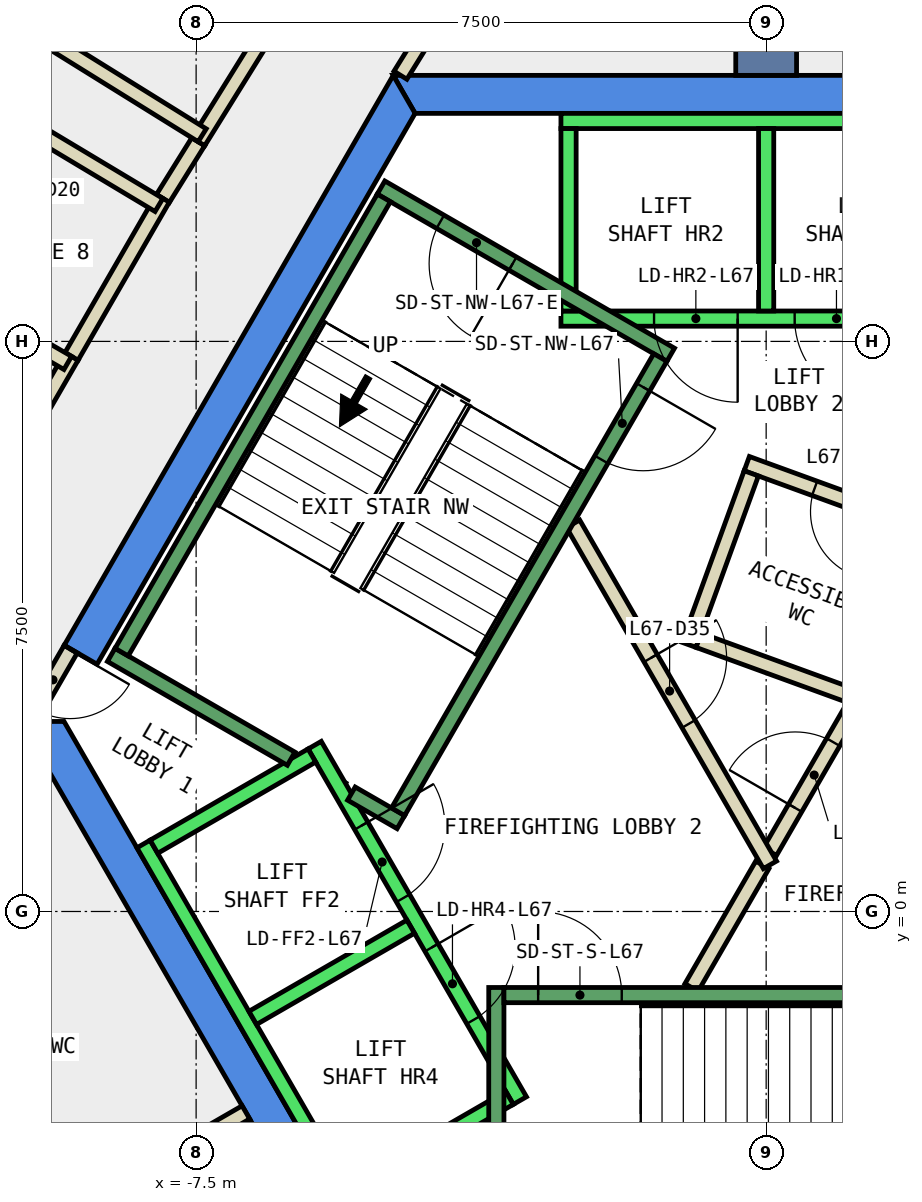
"""IFC4 building model, lengths in metres.
Left out: names, types, materials, properties, quantities, classifications, styles, units other than length and angle.
Written with IfcOpenShell. Run it as: python <this file> out.ifc"""

import sys

from ifc_helpers import new_model, si_unit, direction, frame, frame_2d, origin, place, context, subcontext, project, spatial, polyline, rectangle, outline, extrude, element, fill, save


model = new_model("IFC4")
c1 = context("Model", 3, precision=1e-05, world=origin(), true_north=direction((0.0, 1.0)))
c2 = subcontext(c1, "Body", "Model", "MODEL_VIEW")
j1 = project(units=[si_unit("LENGTHUNIT", "METRE"), si_unit("PLANEANGLEUNIT", "RADIAN")], contexts=[c1])
p1 = place(None, origin())
s1 = spatial("IfcSite", under=j1, at=p1, CompositionType="ELEMENT")
p2 = place(p1, origin())
s2 = spatial("IfcBuilding", under=s1, at=p2, CompositionType="ELEMENT")
p3 = place(p2, frame((0.0, 0.0, 290.0)))
s3 = spatial("IfcBuildingStorey", under=s2, at=p3, CompositionType="ELEMENT", Elevation=290.0)
p4 = place(p3, frame((0.0, 0.0, -0.34)))
e1 = element("IfcWall", 1, at=p4, inside=s3, PredefinedType="SHEAR", context=c2, shape_type="SweptSolid", body=[
    extrude(outline(polyline([(4.907, 11.0), (-4.907, 11.0), (-4.619, 10.5), (4.619, 10.5), (4.907, 11.0)])), origin(), (0.0, 0.0, 1.0), 3.6),
])
p5 = place(p3, frame((0.0, 0.0, -0.34)))
e2 = element("IfcWall", 2, at=p5, inside=s3, PredefinedType="SHEAR", context=c2, shape_type="SweptSolid", body=[
    extrude(outline(polyline([(-9.236, 3.502), (-8.803, 3.253), (-4.619, 10.5), (-4.907, 11.0), (-9.236, 3.502)])), origin(), (0.0, 0.0, 1.0), 3.6),
])
p6 = place(p3, frame((0.0, 0.0, -0.34)))
e3 = element("IfcWall", 3, at=p6, inside=s3, PredefinedType="SHEAR", context=c2, shape_type="SweptSolid", body=[
    extrude(outline(polyline([(-9.815, 2.5), (-4.907, -6.0), (-4.619, -5.5), (-9.238, 2.5), (-9.815, 2.5)])), origin(), (0.0, 0.0, 1.0), 3.6),
])
p7 = place(p3, frame((0.0, 11.0, -0.34), z_axis=(0.0, 0.0, 1.0), x_axis=(0.0, 1.0, 0.0)))
e4 = element("IfcWall", 4, at=p7, inside=s3, PredefinedType="SHEAR", context=c2, shape_type="SweptSolid", body=[
    extrude(rectangle(XDim=9.0, YDim=0.8, at=frame_2d((4.5, 0.0))), origin(), (0.0, 0.0, 1.0), 3.6),
])
p8 = place(p3, frame((2.376, 4.934, 0.0), z_axis=(0.0, 0.0, 1.0), x_axis=(-0.939640574808, 0.342163104635, 0.0)))
e5 = element("IfcWall", 5, at=p8, inside=s3, PredefinedType="PARTITIONING", context=c2, shape_type="SweptSolid", body=[
    extrude(rectangle(XDim=2.8, YDim=0.2, at=frame_2d((1.4, 0.0))), origin(), (0.0, 0.0, 1.0), 3.26),
])
p9 = place(p8, frame((0.95, 0.0, 0.0)))
e6 = element("IfcOpeningElement", 6, at=p9, cuts=e5, PredefinedType="OPENING", context=c2, shape_type="SweptSolid", body=[
    extrude(rectangle(XDim=0.9, YDim=2.1, at=frame_2d((0.45, 1.05))), frame((0.0, 0.11, 0.0), z_axis=(0.0, -1.0, 0.0), x_axis=(1.0, 0.0, 0.0)), (0.0, 0.0, 1.0), 0.22),
])
p10 = place(p3, frame((-0.196, 5.764, 0.0), z_axis=(0.0, 0.0, 1.0), x_axis=(-0.34165322761, -0.939826086073, 0.0)))
e7 = element("IfcWall", 7, at=p10, inside=s3, PredefinedType="PARTITIONING", context=c2, shape_type="SweptSolid", body=[
    extrude(rectangle(XDim=2.4, YDim=0.2, at=frame_2d((1.2, 0.0))), origin(), (0.0, 0.0, 1.0), 3.26),
])
p11 = place(p3, frame((-0.888, 3.568, 0.0), z_axis=(0.0, 0.0, 1.0), x_axis=(0.939685034098, -0.34204098686, 0.0)))
e8 = element("IfcWall", 8, at=p11, inside=s3, PredefinedType="PARTITIONING", context=c2, shape_type="SweptSolid", body=[
    extrude(rectangle(XDim=2.237, YDim=0.2, at=frame_2d((1.119, 0.0))), origin(), (0.0, 0.0, 1.0), 3.26),
])
p12 = place(p3, frame((-4.478, 11.54, 0.0), z_axis=(0.0, 0.0, 1.0), x_axis=(-0.527362861778, -0.849640166198, 0.0)))
e9 = element("IfcWall", 9, at=p12, inside=s3, PredefinedType="PARTITIONING", context=c2, shape_type="SweptSolid", body=[
    extrude(rectangle(XDim=0.633, YDim=0.2, at=frame_2d((0.317, 0.0))), origin(), (0.0, 0.0, 1.0), 3.26),
])
p13 = place(p3, frame((-7.937, 9.38, 0.0), z_axis=(0.0, 0.0, 1.0), x_axis=(0.52850186976, 0.848932137252, 0.0)))
e10 = element("IfcWall", 10, at=p13, inside=s3, PredefinedType="PARTITIONING", context=c2, shape_type="SweptSolid", body=[
    extrude(rectangle(XDim=0.88, YDim=0.2, at=frame_2d((0.44, 0.0))), origin(), (0.0, 0.0, 1.0), 3.26),
])
p14 = place(p3, frame((-7.472, 10.127, 0.0), z_axis=(0.0, 0.0, 1.0), x_axis=(0.527707224705, 0.849426326996, 0.0)))
e11 = element("IfcWall", 11, at=p14, inside=s3, PredefinedType="PARTITIONING", context=c2, shape_type="SweptSolid", body=[
    extrude(rectangle(XDim=3.0, YDim=0.2, at=frame_2d((1.5, 0.0))), origin(), (0.0, 0.0, 1.0), 3.26),
])
p15 = place(p3, frame((-12.082, 2.207, 0.0), z_axis=(0.0, 0.0, 1.0), x_axis=(0.500123454404, 0.865954115618, 0.0)))
e12 = element("IfcWall", 12, at=p15, inside=s3, PredefinedType="PARTITIONING", context=c2, shape_type="SweptSolid", body=[
    extrude(rectangle(XDim=5.885, YDim=0.2, at=frame_2d((2.942, 0.0))), origin(), (0.0, 0.0, 1.0), 3.26),
])
p16 = place(p15, frame((2.493, 0.0, 0.0)))
e13 = element("IfcOpeningElement", 13, at=p16, cuts=e12, PredefinedType="OPENING", context=c2, shape_type="SweptSolid", body=[
    extrude(rectangle(XDim=1.0, YDim=2.1, at=frame_2d((0.5, 1.05))), frame((0.0, 0.11, 0.0), z_axis=(0.0, -1.0, 0.0), x_axis=(1.0, 0.0, 0.0)), (0.0, 0.0, 1.0), 0.22),
])
p17 = place(p3, frame((-9.139, 7.303, 0.0), z_axis=(0.0, 0.0, 1.0), x_axis=(0.499869187296, 0.866100915363, 0.0)))
e14 = element("IfcWall", 14, at=p17, inside=s3, PredefinedType="PARTITIONING", context=c2, shape_type="SweptSolid", body=[
    extrude(rectangle(XDim=2.401, YDim=0.2, at=frame_2d((1.2, 0.0))), origin(), (0.0, 0.0, 1.0), 3.26),
])
p18 = place(p3, frame((-0.982, -1.0, 0.0), z_axis=(0.0, 0.0, 1.0), x_axis=(0.50024047865, 0.865886518847, 0.0)))
e15 = element("IfcWall", 15, at=p18, inside=s3, PredefinedType="PARTITIONING", context=c2, shape_type="SweptSolid", body=[
    extrude(rectangle(XDim=1.863, YDim=0.2, at=frame_2d((0.931, 0.0))), origin(), (0.0, 0.0, 1.0), 3.26),
])
p19 = place(p3, frame((0.05, 0.787, 0.0), z_axis=(0.0, 0.0, 1.0), x_axis=(0.499945861543, 0.866056658381, 0.0)))
e16 = element("IfcWall", 16, at=p19, inside=s3, PredefinedType="PARTITIONING", context=c2, shape_type="SweptSolid", body=[
    extrude(rectangle(XDim=2.428, YDim=0.2, at=frame_2d((1.214, 0.0))), origin(), (0.0, 0.0, 1.0), 3.26),
])
p20 = place(p19, frame((0.664, 0.0, 0.0)))
e17 = element("IfcOpeningElement", 17, at=p20, cuts=e16, PredefinedType="OPENING", context=c2, shape_type="SweptSolid", body=[
    extrude(rectangle(XDim=1.0, YDim=2.1, at=frame_2d((0.5, 1.05))), frame((0.0, 0.11, 0.0), z_axis=(0.0, -1.0, 0.0), x_axis=(1.0, 0.0, 0.0)), (0.0, 0.0, 1.0), 0.22),
])
p21 = place(p3, frame((-2.54, 5.1, 0.0), z_axis=(0.0, 0.0, 1.0), x_axis=(0.499925051871, -0.866068670783, 0.0)))
e18 = element("IfcWall", 18, at=p21, inside=s3, PredefinedType="PARTITIONING", context=c2, shape_type="SweptSolid", body=[
    extrude(rectangle(XDim=5.181, YDim=0.2, at=frame_2d((2.59, 0.0))), origin(), (0.0, 0.0, 1.0), 3.26),
])
p22 = place(p21, frame((2.04, 0.0, 0.0)))
e19 = element("IfcOpeningElement", 19, at=p22, cuts=e18, PredefinedType="OPENING", context=c2, shape_type="SweptSolid", body=[
    extrude(rectangle(XDim=1.0, YDim=2.1, at=frame_2d((0.5, 1.05))), frame((0.0, 0.11, 0.0), z_axis=(0.0, -1.0, 0.0), x_axis=(1.0, 0.0, 0.0)), (0.0, 0.0, 1.0), 0.22),
])
p23 = place(p3, frame((-6.845, -2.643, 0.0), z_axis=(0.0, 0.0, 1.0), x_axis=(-0.865994457699, -0.500053596362, 0.0)))
e20 = element("IfcWall", 20, at=p23, inside=s3, PredefinedType="PARTITIONING", context=c2, shape_type="SweptSolid", body=[
    extrude(rectangle(XDim=6.701, YDim=0.2, at=frame_2d((3.351, 0.0))), origin(), (0.0, 0.0, 1.0), 3.26),
])
p24 = place(p3, frame((-9.543, 11.531, 0.0), z_axis=(0.0, 0.0, 1.0), x_axis=(0.849400119549, -0.527749407305, 0.0)))
e21 = element("IfcWall", 21, at=p24, inside=s3, PredefinedType="PARTITIONING", context=c2, shape_type="SweptSolid", body=[
    extrude(rectangle(XDim=2.5, YDim=0.2, at=frame_2d((1.25, 0.0))), origin(), (0.0, 0.0, 1.0), 3.26),
])
for number, where, z_axis, x_axis in (
    (22, (-7.989, 9.295, 0.0), (0.0, 0.0, 1.0), (-0.858, 0.514, 0.0)),
    (23, (-11.181, 8.367, 0.0), (0.0, 0.0, 1.0), (0.866, -0.5, 0.0)),
):
    element("IfcWall", number, at=place(p3, frame(where, z_axis=z_axis, x_axis=x_axis)), inside=s3, PredefinedType="PARTITIONING", context=c2, shape_type="SweptSolid", body=[
        extrude(rectangle(XDim=2.3, YDim=0.2, at=frame_2d((1.15, 0.0))), origin(), (0.0, 0.0, 1.0), 3.26),
    ])
p25 = place(p3, frame((-9.15, 3.452, 0.0), z_axis=(0.0, 0.0, 1.0), x_axis=(-0.500079945886, -0.865979242085, 0.0)))
e24 = element("IfcWall", 24, at=p25, inside=s3, PredefinedType="PARTITIONING", context=c2, shape_type="SweptSolid", body=[
    extrude(rectangle(XDim=0.926, YDim=0.2, at=frame_2d((0.463, 0.0))), origin(), (0.0, 0.0, 1.0), 2.4),
])
p26 = place(p25, frame((0.017, 0.0, 0.0)))
e25 = element("IfcOpeningElement", 25, at=p26, cuts=e24, PredefinedType="OPENING", context=c2, shape_type="SweptSolid", body=[
    extrude(rectangle(XDim=0.9, YDim=2.1, at=frame_2d((0.45, 1.05))), frame((0.0, 0.11, 0.0), z_axis=(0.0, -1.0, 0.0), x_axis=(1.0, 0.0, 0.0)), (0.0, 0.0, 1.0), 0.22),
])
p27 = place(p3, frame((2.7, 7.8, 0.0), z_axis=(0.0, 0.0, 1.0), x_axis=(-1.0, 0.0, 0.0)))
e26 = element("IfcWall", 26, at=p27, inside=s3, PredefinedType="STANDARD", context=c2, shape_type="SweptSolid", body=[
    extrude(rectangle(XDim=5.4, YDim=0.2, at=frame_2d((2.7, 0.0))), origin(), (0.0, 0.0, 1.0), 3.26),
])
p28 = place(p27, frame((1.225, 0.0, 0.0)))
e27 = element("IfcOpeningElement", 27, at=p28, cuts=e26, PredefinedType="OPENING", context=c2, shape_type="SweptSolid", body=[
    extrude(rectangle(XDim=1.1, YDim=2.1, at=frame_2d((0.55, 1.05))), frame((0.0, 0.11, 0.0), z_axis=(0.0, -1.0, 0.0), x_axis=(1.0, 0.0, 0.0)), (0.0, 0.0, 1.0), 0.22),
])
p29 = place(p27, frame((3.075, 0.0, 0.0)))
e28 = element("IfcOpeningElement", 28, at=p29, cuts=e26, PredefinedType="OPENING", context=c2, shape_type="SweptSolid", body=[
    extrude(rectangle(XDim=1.1, YDim=2.1, at=frame_2d((0.55, 1.05))), frame((0.0, 0.11, 0.0), z_axis=(0.0, -1.0, 0.0), x_axis=(1.0, 0.0, 0.0)), (0.0, 0.0, 1.0), 0.22),
])
p30 = place(p3, frame((2.7, 10.4, 0.0), z_axis=(0.0, 0.0, 1.0), x_axis=(-1.0, 0.0, 0.0)))
e29 = element("IfcWall", 29, at=p30, inside=s3, PredefinedType="STANDARD", context=c2, shape_type="SweptSolid", body=[
    extrude(rectangle(XDim=5.4, YDim=0.2, at=frame_2d((2.7, 0.0))), origin(), (0.0, 0.0, 1.0), 3.26),
])
for number, where, z_axis, x_axis in (
    (30, (0.0, 7.9, 0.0), (0.0, 0.0, 1.0), (0.0, 1.0, 0.0)),
    (31, (-2.6, 7.9, 0.0), (0.0, 0.0, 1.0), (0.0, 1.0, 0.0)),
):
    element("IfcWall", number, at=place(p3, frame(where, z_axis=z_axis, x_axis=x_axis)), inside=s3, PredefinedType="STANDARD", context=c2, shape_type="SweptSolid", body=[
        extrude(rectangle(XDim=2.4, YDim=0.2, at=frame_2d((1.2, 0.0))), origin(), (0.0, 0.0, 1.0), 3.26),
    ])
p31 = place(p3, frame((-5.94, 2.188, 0.0), z_axis=(0.0, 0.0, 1.0), x_axis=(0.500034260056, -0.866005622828, 0.0)))
e32 = element("IfcWall", 32, at=p31, inside=s3, PredefinedType="STANDARD", context=c2, shape_type="SweptSolid", body=[
    extrude(rectangle(XDim=5.399, YDim=0.2, at=frame_2d((2.7, 0.0))), origin(), (0.0, 0.0, 1.0), 3.26),
])
p32 = place(p31, frame((3.075, 0.0, 0.0)))
e33 = element("IfcOpeningElement", 33, at=p32, cuts=e32, PredefinedType="OPENING", context=c2, shape_type="SweptSolid", body=[
    extrude(rectangle(XDim=1.1, YDim=2.1, at=frame_2d((0.55, 1.05))), frame((0.0, 0.11, 0.0), z_axis=(0.0, -1.0, 0.0), x_axis=(1.0, 0.0, 0.0)), (0.0, 0.0, 1.0), 0.22),
])
p33 = place(p31, frame((1.225, 0.0, 0.0)))
e34 = element("IfcOpeningElement", 34, at=p33, cuts=e32, PredefinedType="OPENING", context=c2, shape_type="SweptSolid", body=[
    extrude(rectangle(XDim=1.1, YDim=2.1, at=frame_2d((0.55, 1.05))), frame((0.0, 0.11, 0.0), z_axis=(0.0, -1.0, 0.0), x_axis=(1.0, 0.0, 0.0)), (0.0, 0.0, 1.0), 0.22),
])
p34 = place(p3, frame((-8.192, 0.888, 0.0), z_axis=(0.0, 0.0, 1.0), x_axis=(0.500034260056, -0.866005622828, 0.0)))
e35 = element("IfcWall", 35, at=p34, inside=s3, PredefinedType="STANDARD", context=c2, shape_type="SweptSolid", body=[
    extrude(rectangle(XDim=5.399, YDim=0.2, at=frame_2d((2.7, 0.0))), origin(), (0.0, 0.0, 1.0), 3.26),
])
for number, where, z_axis, x_axis in (
    (36, (-5.977, 2.052, 0.0), (0.0, 0.0, 1.0), (-0.866, -0.5, 0.0)),
    (37, (-4.677, -0.2, 0.0), (0.0, 0.0, 1.0), (-0.866, -0.5, 0.0)),
):
    element("IfcWall", number, at=place(p3, frame(where, z_axis=z_axis, x_axis=x_axis)), inside=s3, PredefinedType="STANDARD", context=c2, shape_type="SweptSolid", body=[
        extrude(rectangle(XDim=2.399, YDim=0.2, at=frame_2d((1.2, 0.0))), origin(), (0.0, 0.0, 1.0), 3.26),
    ])
p35 = place(p3, frame((-3.377, -2.452, 0.0), z_axis=(0.0, 0.0, 1.0), x_axis=(-0.865955154139, -0.50012165622, 0.0)))
e38 = element("IfcWall", 38, at=p35, inside=s3, PredefinedType="STANDARD", context=c2, shape_type="SweptSolid", body=[
    extrude(rectangle(XDim=2.4, YDim=0.2, at=frame_2d((1.2, 0.0))), origin(), (0.0, 0.0, 1.0), 3.26),
])
p36 = place(p3, frame((-3.55, -1.0, 0.0), z_axis=(0.0, 0.0, 1.0), x_axis=(0.0, -1.0, 0.0)))
e39 = element("IfcWall", 39, at=p36, inside=s3, PredefinedType="STANDARD", context=c2, shape_type="SweptSolid", body=[
    extrude(rectangle(XDim=4.4, YDim=0.2, at=frame_2d((2.2, 0.0))), origin(), (0.0, 0.0, 1.0), 3.26),
])
p37 = place(p36, frame((2.4, 0.0, 0.0)))
e40 = element("IfcOpeningElement", 40, at=p37, cuts=e39, PredefinedType="OPENING", context=c2, shape_type="SweptSolid", body=[
    extrude(rectangle(XDim=1.1, YDim=2.2, at=frame_2d((0.55, 1.1))), frame((0.0, 0.11, 0.0), z_axis=(0.0, -1.0, 0.0), x_axis=(1.0, 0.0, 0.0)), (0.0, 0.0, 1.0), 0.22),
])
p38 = place(p3, frame((-3.45, -1.1, 0.0), z_axis=(0.0, 0.0, 1.0), x_axis=(1.0, 0.0, 0.0)))
e41 = element("IfcWall", 41, at=p38, inside=s3, PredefinedType="STANDARD", context=c2, shape_type="SweptSolid", body=[
    extrude(rectangle(XDim=6.9, YDim=0.2, at=frame_2d((3.45, 0.0))), origin(), (0.0, 0.0, 1.0), 3.26),
])
p39 = place(p38, frame((0.45, 0.0, 0.0)))
e42 = element("IfcOpeningElement", 42, at=p39, cuts=e41, PredefinedType="OPENING", context=c2, shape_type="SweptSolid", body=[
    extrude(rectangle(XDim=1.1, YDim=2.2, at=frame_2d((0.55, 1.1))), frame((0.0, 0.11, 0.0), z_axis=(0.0, -1.0, 0.0), x_axis=(1.0, 0.0, 0.0)), (0.0, 0.0, 1.0), 0.22),
])
p40 = place(p3, frame((-1.256, 7.324, 0.0), z_axis=(0.0, 0.0, 1.0), x_axis=(-0.866046073146, 0.499964197906, 0.0)))
e43 = element("IfcWall", 43, at=p40, inside=s3, PredefinedType="STANDARD", context=c2, shape_type="SweptSolid", body=[
    extrude(rectangle(XDim=4.4, YDim=0.2, at=frame_2d((2.2, 0.0))), origin(), (0.0, 0.0, 1.0), 3.26),
])
p41 = place(p40, frame((2.4, 0.0, 0.0)))
e44 = element("IfcOpeningElement", 44, at=p41, cuts=e43, PredefinedType="OPENING", context=c2, shape_type="SweptSolid", body=[
    extrude(rectangle(XDim=1.1, YDim=2.2, at=frame_2d((0.55, 1.1))), frame((0.0, 0.11, 0.0), z_axis=(0.0, -1.0, 0.0), x_axis=(1.0, 0.0, 0.0)), (0.0, 0.0, 1.0), 0.22),
])
p42 = place(p3, frame((-6.25, 2.01, 0.0), z_axis=(0.0, 0.0, 1.0), x_axis=(-0.86611865017, 0.499838457731, 0.0)))
e45 = element("IfcWall", 45, at=p42, inside=s3, PredefinedType="STANDARD", context=c2, shape_type="SweptSolid", body=[
    extrude(rectangle(XDim=2.733, YDim=0.2, at=frame_2d((1.366, 0.0))), origin(), (0.0, 0.0, 1.0), 3.26),
])
p43 = place(p3, frame((-4.806, 1.176, 0.0), z_axis=(0.0, 0.0, 1.0), x_axis=(-0.866558586415, 0.499075361355, 0.0)))
e46 = element("IfcWall", 46, at=p43, inside=s3, PredefinedType="STANDARD", context=c2, shape_type="SweptSolid", body=[
    extrude(rectangle(XDim=0.751, YDim=0.2, at=frame_2d((0.376, 0.0))), origin(), (0.0, 0.0, 1.0), 3.26),
])
p44 = place(p3, frame((-1.393, 7.288, 0.0), z_axis=(0.0, 0.0, 1.0), x_axis=(-0.499963383562, -0.866046543262, 0.0)))
e47 = element("IfcWall", 47, at=p44, inside=s3, PredefinedType="STANDARD", context=c2, shape_type="SweptSolid", body=[
    extrude(rectangle(XDim=6.9, YDim=0.2, at=frame_2d((3.45, 0.0))), origin(), (0.0, 0.0, 1.0), 3.26),
])
p45 = place(p44, frame((0.45, 0.0, 0.0)))
e48 = element("IfcOpeningElement", 48, at=p45, cuts=e47, PredefinedType="OPENING", context=c2, shape_type="SweptSolid", body=[
    extrude(rectangle(XDim=1.1, YDim=2.2, at=frame_2d((0.55, 1.1))), frame((0.0, 0.11, 0.0), z_axis=(0.0, -1.0, 0.0), x_axis=(1.0, 0.0, 0.0)), (0.0, 0.0, 1.0), 0.22),
])
p46 = place(p3, frame((-5.03, 9.388, 0.0), z_axis=(0.0, 0.0, 1.0), x_axis=(-0.499978703459, -0.866037698999, 0.0)))
e49 = element("IfcWall", 49, at=p46, inside=s3, PredefinedType="STANDARD", context=c2, shape_type="SweptSolid", body=[
    extrude(rectangle(XDim=6.9, YDim=0.2, at=frame_2d((3.45, 0.0))), origin(), (0.0, 0.0, 1.0), 3.26),
])
p47 = place(p20, origin())
e50 = element("IfcDoor", 50, at=p47, inside=s3, OperationType="SINGLE_SWING_RIGHT", PredefinedType="DOOR", context=c2, shape_type="SweptSolid", body=[
    extrude(rectangle(XDim=1.0, YDim=2.1, at=frame_2d((0.5, 1.05))), frame((0.0, 0.025, 0.0), z_axis=(0.0, -1.0, 0.0), x_axis=(1.0, 0.0, 0.0)), (0.0, 0.0, 1.0), 0.05),
])
fill(e17, e50)
p48 = place(p22, origin())
e51 = element("IfcDoor", 51, at=p48, inside=s3, OperationType="SINGLE_SWING_RIGHT", PredefinedType="DOOR", context=c2, shape_type="SweptSolid", body=[
    extrude(rectangle(XDim=1.0, YDim=2.1, at=frame_2d((0.5, 1.05))), frame((0.0, 0.025, 0.0), z_axis=(0.0, -1.0, 0.0), x_axis=(1.0, 0.0, 0.0)), (0.0, 0.0, 1.0), 0.05),
])
fill(e19, e51)
p49 = place(p9, origin())
e52 = element("IfcDoor", 52, at=p49, inside=s3, OperationType="SINGLE_SWING_LEFT", PredefinedType="DOOR", context=c2, shape_type="SweptSolid", body=[
    extrude(rectangle(XDim=0.9, YDim=2.1, at=frame_2d((0.45, 1.05))), frame((0.0, 0.025, 0.0), z_axis=(0.0, -1.0, 0.0), x_axis=(1.0, 0.0, 0.0)), (0.0, 0.0, 1.0), 0.05),
])
fill(e6, e52)
p50 = place(p26, origin())
e53 = element("IfcDoor", 53, at=p50, inside=s3, OperationType="SINGLE_SWING_LEFT", PredefinedType="DOOR", context=c2, shape_type="SweptSolid", body=[
    extrude(rectangle(XDim=0.9, YDim=2.1, at=frame_2d((0.45, 1.05))), frame((0.0, 0.025, 0.0), z_axis=(0.0, -1.0, 0.0), x_axis=(1.0, 0.0, 0.0)), (0.0, 0.0, 1.0), 0.05),
])
fill(e25, e53)
p51 = place(p28, origin())
e54 = element("IfcDoor", 54, at=p51, inside=s3, OperationType="SLIDING_TO_LEFT", PredefinedType="DOOR", context=c2, shape_type="SweptSolid", body=[
    extrude(rectangle(XDim=1.1, YDim=2.1, at=frame_2d((0.55, 1.05))), frame((0.0, 0.025, 0.0), z_axis=(0.0, -1.0, 0.0), x_axis=(1.0, 0.0, 0.0)), (0.0, 0.0, 1.0), 0.05),
])
fill(e27, e54)
p52 = place(p29, origin())
e55 = element("IfcDoor", 55, at=p52, inside=s3, OperationType="SLIDING_TO_LEFT", PredefinedType="DOOR", context=c2, shape_type="SweptSolid", body=[
    extrude(rectangle(XDim=1.1, YDim=2.1, at=frame_2d((0.55, 1.05))), frame((0.0, 0.025, 0.0), z_axis=(0.0, -1.0, 0.0), x_axis=(1.0, 0.0, 0.0)), (0.0, 0.0, 1.0), 0.05),
])
fill(e28, e55)
p53 = place(p32, origin())
e56 = element("IfcDoor", 56, at=p53, inside=s3, OperationType="SLIDING_TO_LEFT", PredefinedType="DOOR", context=c2, shape_type="SweptSolid", body=[
    extrude(rectangle(XDim=1.1, YDim=2.1, at=frame_2d((0.55, 1.05))), frame((0.0, 0.025, 0.0), z_axis=(0.0, -1.0, 0.0), x_axis=(1.0, 0.0, 0.0)), (0.0, 0.0, 1.0), 0.05),
])
fill(e33, e56)
p54 = place(p33, origin())
e57 = element("IfcDoor", 57, at=p54, inside=s3, OperationType="SLIDING_TO_LEFT", PredefinedType="DOOR", context=c2, shape_type="SweptSolid", body=[
    extrude(rectangle(XDim=1.1, YDim=2.1, at=frame_2d((0.55, 1.05))), frame((0.0, 0.025, 0.0), z_axis=(0.0, -1.0, 0.0), x_axis=(1.0, 0.0, 0.0)), (0.0, 0.0, 1.0), 0.05),
])
fill(e34, e57)
p55 = place(p39, origin())
e58 = element("IfcDoor", 58, at=p55, inside=s3, OperationType="SINGLE_SWING_LEFT", PredefinedType="DOOR", context=c2, shape_type="SweptSolid", body=[
    extrude(rectangle(XDim=1.1, YDim=2.2, at=frame_2d((0.55, 1.1))), frame((0.0, 0.025, 0.0), z_axis=(0.0, -1.0, 0.0), x_axis=(1.0, 0.0, 0.0)), (0.0, 0.0, 1.0), 0.05),
])
fill(e42, e58)
p56 = place(p45, origin())
e59 = element("IfcDoor", 59, at=p56, inside=s3, OperationType="SINGLE_SWING_LEFT", PredefinedType="DOOR", context=c2, shape_type="SweptSolid", body=[
    extrude(rectangle(XDim=1.1, YDim=2.2, at=frame_2d((0.55, 1.1))), frame((0.0, 0.025, 0.0), z_axis=(0.0, -1.0, 0.0), x_axis=(1.0, 0.0, 0.0)), (0.0, 0.0, 1.0), 0.05),
])
fill(e48, e59)
p57 = place(p41, origin())
e60 = element("IfcDoor", 60, at=p57, inside=s3, OperationType="SINGLE_SWING_LEFT", PredefinedType="DOOR", context=c2, shape_type="SweptSolid", body=[
    extrude(rectangle(XDim=1.1, YDim=2.2, at=frame_2d((0.55, 1.1))), frame((0.0, 0.025, 0.0), z_axis=(0.0, -1.0, 0.0), x_axis=(1.0, 0.0, 0.0)), (0.0, 0.0, 1.0), 0.05),
])
fill(e44, e60)
save(model, sys.argv[1])
